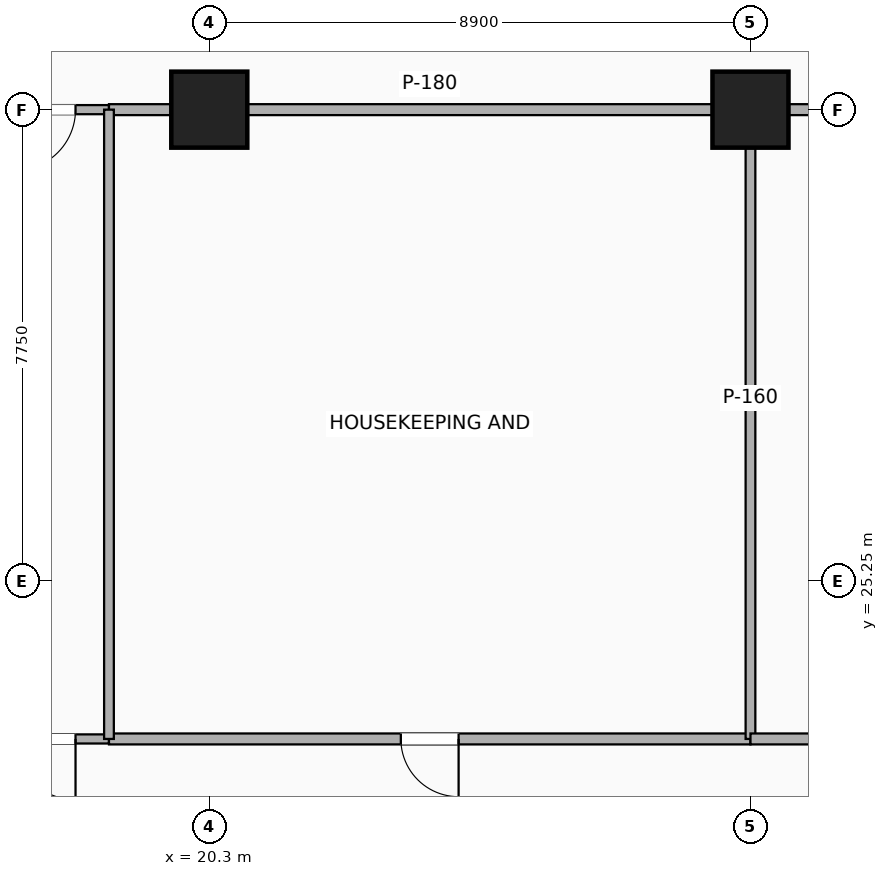
"""IFC4 building model, lengths in metres.
Left out: names, types, materials, properties, quantities, classifications, styles, units other than length and angle.
Written with IfcOpenShell. Run it as: python <this file> out.ifc"""

import sys

from ifc_helpers import new_model, si_unit, direction, frame, frame_2d, origin, origin_2d, place, context, subcontext, project, spatial, rectangle, extrude, element, fill, save


model = new_model("IFC4")
c1 = context("Model", 3, precision=1e-05, world=origin(), true_north=direction((0.0, 1.0)))
c2 = subcontext(c1, "Body", "Model", "MODEL_VIEW")
j1 = project(units=[si_unit("LENGTHUNIT", "METRE"), si_unit("PLANEANGLEUNIT", "RADIAN")], contexts=[c1])
p1 = place(None, origin())
s1 = spatial("IfcSite", under=j1, at=p1, CompositionType="ELEMENT")
p2 = place(p1, origin())
s2 = spatial("IfcBuilding", under=s1, at=p2, CompositionType="ELEMENT")
p3 = place(p2, frame((0.0, 0.0, 91.7)))
s3 = spatial("IfcBuildingStorey", under=s2, at=p3, CompositionType="ELEMENT", Elevation=91.7)
for number, where, z_axis, x_axis in (
    (1, (20.3, 33.0, -0.26), (0.0, 0.0, 1.0), (1.0, 0.0, 0.0)),
    (2, (29.2, 33.0, -0.26), (0.0, 0.0, 1.0), (1.0, 0.0, 0.0)),
):
    element("IfcColumn", number, at=place(p3, frame(where, z_axis=z_axis, x_axis=x_axis)), inside=s3, PredefinedType="COLUMN", context=c2, shape_type="SweptSolid", body=[
        extrude(rectangle(XDim=1.25, YDim=1.25, at=origin_2d()), origin(), (0.0, 0.0, 1.0), 3.5),
    ])
p4 = place(p3, frame((16.65, 22.65, 0.0), z_axis=(0.0, 0.0, 1.0), x_axis=(1.0, 0.0, 0.0)))
e3 = element("IfcWall", 3, at=p4, inside=s3, PredefinedType="PARTITIONING", context=c2, shape_type="SweptSolid", body=[
    extrude(rectangle(XDim=2.0, YDim=0.15, at=frame_2d((1.0, 0.0))), origin(), (0.0, 0.0, 1.0), 3.24),
])
p5 = place(p4, frame((0.45, 0.0, 0.0)))
e4 = element("IfcOpeningElement", 4, at=p5, cuts=e3, PredefinedType="OPENING", context=c2, shape_type="SweptSolid", body=[
    extrude(rectangle(XDim=1.0, YDim=2.15, at=frame_2d((0.5, 1.075))), frame((0.0, 0.085, 0.0), z_axis=(0.0, -1.0, 0.0), x_axis=(1.0, 0.0, 0.0)), (0.0, 0.0, 1.0), 0.17),
])
p6 = place(p3, frame((16.65, 33.0, 0.0), z_axis=(0.0, 0.0, 1.0), x_axis=(1.0, 0.0, 0.0)))
e5 = element("IfcWall", 5, at=p6, inside=s3, PredefinedType="PARTITIONING", context=c2, shape_type="SweptSolid", body=[
    extrude(rectangle(XDim=2.0, YDim=0.15, at=frame_2d((1.0, 0.0))), origin(), (0.0, 0.0, 1.0), 2.313),
])
p7 = place(p6, frame((0.45, 0.0, 0.0)))
e6 = element("IfcOpeningElement", 6, at=p7, cuts=e5, PredefinedType="OPENING", context=c2, shape_type="SweptSolid", body=[
    extrude(rectangle(XDim=1.0, YDim=2.15, at=frame_2d((0.5, 1.075))), frame((0.0, 0.085, 0.0), z_axis=(0.0, -1.0, 0.0), x_axis=(1.0, 0.0, 0.0)), (0.0, 0.0, 1.0), 0.17),
])
p8 = place(p3, frame((18.65, 22.65, 0.0), z_axis=(0.0, 0.0, 1.0), x_axis=(1.0, 0.0, 0.0)))
e7 = element("IfcWall", 7, at=p8, inside=s3, PredefinedType="PARTITIONING", context=c2, shape_type="SweptSolid", body=[
    extrude(rectangle(XDim=10.55, YDim=0.18, at=frame_2d((5.275, 0.0))), origin(), (0.0, 0.0, 1.0), 2.313),
])
p9 = place(p8, frame((4.8, 0.0, 0.0)))
e8 = element("IfcOpeningElement", 8, at=p9, cuts=e7, PredefinedType="OPENING", context=c2, shape_type="SweptSolid", body=[
    extrude(rectangle(XDim=0.95, YDim=2.15, at=frame_2d((0.475, 1.075))), frame((0.0, 0.1, 0.0), z_axis=(0.0, -1.0, 0.0), x_axis=(1.0, 0.0, 0.0)), (0.0, 0.0, 1.0), 0.2),
])
p10 = place(p3, frame((18.65, 33.0, 0.0), z_axis=(0.0, 0.0, 1.0), x_axis=(1.0, 0.0, 0.0)))
e9 = element("IfcWall", 9, at=p10, inside=s3, PredefinedType="PARTITIONING", context=c2, shape_type="SweptSolid", body=[
    extrude(rectangle(XDim=10.55, YDim=0.18, at=frame_2d((5.275, 0.0))), origin(), (0.0, 0.0, 1.0), 2.313),
])
for number, where, z_axis, x_axis in (
    (10, (18.65, 22.65, 0.0), (0.0, 0.0, 1.0), (0.0, 1.0, 0.0)),
    (11, (29.2, 22.65, 0.0), (0.0, 0.0, 1.0), (0.0, 1.0, 0.0)),
):
    element("IfcWall", number, at=place(p3, frame(where, z_axis=z_axis, x_axis=x_axis)), inside=s3, PredefinedType="PARTITIONING", context=c2, shape_type="SweptSolid", body=[
        extrude(rectangle(XDim=10.35, YDim=0.16, at=frame_2d((5.175, 0.0))), origin(), (0.0, 0.0, 1.0), 2.313),
    ])
p11 = place(p3, frame((29.2, 22.65, 0.0), z_axis=(0.0, 0.0, 1.0), x_axis=(1.0, 0.0, 0.0)))
e12 = element("IfcWall", 12, at=p11, inside=s3, PredefinedType="PARTITIONING", context=c2, shape_type="SweptSolid", body=[
    extrude(rectangle(XDim=3.9, YDim=0.18, at=frame_2d((1.95, 0.0))), origin(), (0.0, 0.0, 1.0), 2.313),
])
p12 = place(p11, frame((1.475, 0.0, 0.0)))
e13 = element("IfcOpeningElement", 13, at=p12, cuts=e12, PredefinedType="OPENING", context=c2, shape_type="SweptSolid", body=[
    extrude(rectangle(XDim=0.95, YDim=2.15, at=frame_2d((0.475, 1.075))), frame((0.0, 0.1, 0.0), z_axis=(0.0, -1.0, 0.0), x_axis=(1.0, 0.0, 0.0)), (0.0, 0.0, 1.0), 0.2),
])
p13 = place(p3, frame((29.2, 33.0, 0.0), z_axis=(0.0, 0.0, 1.0), x_axis=(1.0, 0.0, 0.0)))
e14 = element("IfcWall", 14, at=p13, inside=s3, PredefinedType="PARTITIONING", context=c2, shape_type="SweptSolid", body=[
    extrude(rectangle(XDim=3.9, YDim=0.18, at=frame_2d((1.95, 0.0))), origin(), (0.0, 0.0, 1.0), 2.313),
])
p14 = place(p5, origin())
e15 = element("IfcDoor", 15, at=p14, inside=s3, OperationType="SINGLE_SWING_RIGHT", PredefinedType="DOOR", context=c2, shape_type="SweptSolid", body=[
    extrude(rectangle(XDim=1.0, YDim=2.15, at=frame_2d((0.5, 1.075))), frame((0.0, 0.025, 0.0), z_axis=(0.0, -1.0, 0.0), x_axis=(1.0, 0.0, 0.0)), (0.0, 0.0, 1.0), 0.05),
])
fill(e4, e15)
p15 = place(p7, origin())
e16 = element("IfcDoor", 16, at=p15, inside=s3, OperationType="SINGLE_SWING_LEFT", PredefinedType="DOOR", context=c2, shape_type="SweptSolid", body=[
    extrude(rectangle(XDim=1.0, YDim=2.15, at=frame_2d((0.5, 1.075))), frame((0.0, 0.025, 0.0), z_axis=(0.0, -1.0, 0.0), x_axis=(1.0, 0.0, 0.0)), (0.0, 0.0, 1.0), 0.05),
])
fill(e6, e16)
p16 = place(p9, origin())
e17 = element("IfcDoor", 17, at=p16, inside=s3, OperationType="SINGLE_SWING_RIGHT", PredefinedType="DOOR", context=c2, shape_type="SweptSolid", body=[
    extrude(rectangle(XDim=0.95, YDim=2.15, at=frame_2d((0.475, 1.075))), frame((0.0, 0.025, 0.0), z_axis=(0.0, -1.0, 0.0), x_axis=(1.0, 0.0, 0.0)), (0.0, 0.0, 1.0), 0.05),
])
fill(e8, e17)
save(model, sys.argv[1])
